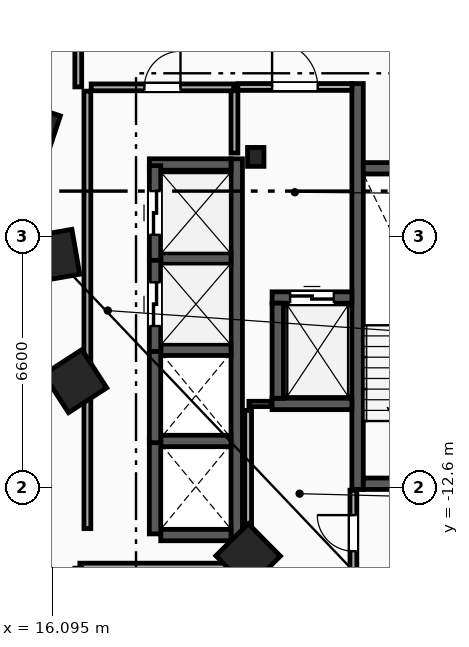
"""IFC4 building model, lengths in metres.
Left out: names, types, materials, properties, quantities, classifications, styles, units other than length and angle.
Written with IfcOpenShell. Run it as: python <this file> out.ifc"""

import sys

from ifc_helpers import new_model, si_unit, direction, frame, frame_2d, origin, origin_2d, place, context, subcontext, project, spatial, rectangle, i_section, extrude, element, fill, save


model = new_model("IFC4")
c1 = context("Model", 3, precision=1e-05, world=origin(), true_north=direction((0.0, 1.0)))
c2 = subcontext(c1, "Body", "Model", "MODEL_VIEW")
j1 = project(units=[si_unit("LENGTHUNIT", "METRE"), si_unit("PLANEANGLEUNIT", "RADIAN")], contexts=[c1])
p1 = place(None, origin())
s1 = spatial("IfcSite", under=j1, at=p1, CompositionType="ELEMENT")
p2 = place(p1, origin())
s2 = spatial("IfcBuilding", under=s1, at=p2, CompositionType="ELEMENT")
p3 = place(p2, frame((0.0, 0.0, 24.0)))
s3 = spatial("IfcBuildingStorey", under=s2, at=p3, CompositionType="ELEMENT", Elevation=24.0)
p4 = place(p3, frame((21.45, -3.9, 0.0), z_axis=(0.0, 0.0, 1.0), x_axis=(1.0, 0.0, 0.0)))
e1 = element("IfcColumn", 1, at=p4, inside=s3, PredefinedType="COLUMN", context=c2, shape_type="SweptSolid", body=[
    extrude(i_section(OverallWidth=0.432, OverallDepth=0.498, WebThickness=0.056, FlangeThickness=0.089, FilletRadius=0.018, at=origin_2d()), origin(), (0.0, 0.0, 1.0), 3.8),
])
for number, where, z_axis, x_axis in (
    (2, (15.55, -3.2, 0.0), (0.0, 0.0, 1.0), (-0.315, -0.949, 0.0)),
    (3, (16.125, -6.5, 0.0), (0.0, 0.0, 1.0), (0.172, -0.985, 0.0)),
    (4, (16.7, -9.8, 0.0), (0.0, 0.0, 1.0), (0.544, -0.839, 0.0)),
    (5, (21.25, -14.4, 0.0), (0.0, 0.0, 1.0), (0.703, -0.711, 0.0)),
):
    element("IfcColumn", number, at=place(p3, frame(where, z_axis=z_axis, x_axis=x_axis)), inside=s3, PredefinedType="COLUMN", context=c2, shape_type="SweptSolid", body=[
        extrude(rectangle(XDim=1.2, YDim=1.2, at=origin_2d()), origin(), (0.0, 0.0, 1.0), 3.8),
    ])
p5 = place(p3, frame((24.13, -12.65, 0.0), z_axis=(0.0, 0.0, 1.0), x_axis=(0.0, 1.0, 0.0)))
e6 = element("IfcWall", 6, at=p5, inside=s3, PredefinedType="SHEAR", context=c2, shape_type="SweptSolid", body=[
    extrude(rectangle(XDim=10.68, YDim=0.3, at=frame_2d((5.34, 0.0))), origin(), (0.0, 0.0, 1.0), 3.5),
])
p6 = place(p3, frame((24.28, -12.5, 0.0), z_axis=(0.0, 0.0, 1.0), x_axis=(1.0, 0.0, 0.0)))
e7 = element("IfcWall", 7, at=p6, inside=s3, PredefinedType="SHEAR", context=c2, shape_type="SweptSolid", body=[
    extrude(rectangle(XDim=3.16, YDim=0.3, at=frame_2d((1.58, 0.0))), origin(), (0.0, 0.0, 1.0), 3.5),
])
p7 = place(p6, frame((1.03, 0.0, 0.0)))
e8 = element("IfcOpeningElement", 8, at=p7, cuts=e7, PredefinedType="OPENING", context=c2, shape_type="SweptSolid", body=[
    extrude(rectangle(XDim=1.1, YDim=2.15, at=frame_2d((0.55, 1.075))), frame((0.0, 0.16, 0.0), z_axis=(0.0, -1.0, 0.0), x_axis=(1.0, 0.0, 0.0)), (0.0, 0.0, 1.0), 0.32),
])
p8 = place(p3, frame((24.28, -4.2, 0.0), z_axis=(0.0, 0.0, 1.0), x_axis=(1.0, 0.0, 0.0)))
e9 = element("IfcWall", 9, at=p8, inside=s3, PredefinedType="SHEAR", context=c2, shape_type="SweptSolid", body=[
    extrude(rectangle(XDim=3.16, YDim=0.3, at=frame_2d((1.58, 0.0))), origin(), (0.0, 0.0, 1.0), 3.5),
])
p9 = place(p3, frame((20.89, -3.8, 0.0), z_axis=(0.0, 0.0, 1.0), x_axis=(0.0, 1.0, 0.0)))
e10 = element("IfcWall", 10, at=p9, inside=s3, PredefinedType="PARTITIONING", context=c2, shape_type="SweptSolid", body=[
    extrude(rectangle(XDim=1.65, YDim=0.18, at=frame_2d((0.825, 0.0))), origin(), (0.0, 0.0, 1.0), 3.5),
])
p10 = place(p3, frame((20.98, -2.06, 0.0), z_axis=(0.0, 0.0, 1.0), x_axis=(1.0, 0.0, 0.0)))
e11 = element("IfcWall", 11, at=p10, inside=s3, PredefinedType="PARTITIONING", context=c2, shape_type="SweptSolid", body=[
    extrude(rectangle(XDim=3.0, YDim=0.18, at=frame_2d((1.5, 0.0))), origin(), (0.0, 0.0, 1.0), 3.5),
])
p11 = place(p10, frame((0.9, 0.0, 0.0)))
e12 = element("IfcOpeningElement", 12, at=p11, cuts=e11, PredefinedType="OPENING", context=c2, shape_type="SweptSolid", body=[
    extrude(rectangle(XDim=1.2, YDim=2.15, at=frame_2d((0.6, 1.075))), frame((0.0, 0.1, 0.0), z_axis=(0.0, -1.0, 0.0), x_axis=(1.0, 0.0, 0.0)), (0.0, 0.0, 1.0), 0.2),
])
p12 = place(p3, frame((21.88, -7.6, 0.0), z_axis=(0.0, 0.0, 1.0), x_axis=(1.0, 0.0, 0.0)))
e13 = element("IfcWall", 13, at=p12, inside=s3, PredefinedType="SHEAR", context=c2, shape_type="SweptSolid", body=[
    extrude(rectangle(XDim=2.1, YDim=0.3, at=frame_2d((1.05, 0.0))), origin(), (0.0, 0.0, 1.0), 3.5),
])
p13 = place(p12, frame((0.475, 0.0, 0.0)))
e14 = element("IfcOpeningElement", 14, at=p13, cuts=e13, PredefinedType="OPENING", context=c2, shape_type="SweptSolid", body=[
    extrude(rectangle(XDim=1.15, YDim=2.2, at=frame_2d((0.575, 1.1))), frame((0.0, 0.16, 0.0), z_axis=(0.0, -1.0, 0.0), x_axis=(1.0, 0.0, 0.0)), (0.0, 0.0, 1.0), 0.32),
])
p14 = place(p3, frame((21.88, -10.4, 0.0), z_axis=(0.0, 0.0, 1.0), x_axis=(1.0, 0.0, 0.0)))
e15 = element("IfcWall", 15, at=p14, inside=s3, PredefinedType="SHEAR", context=c2, shape_type="SweptSolid", body=[
    extrude(rectangle(XDim=2.1, YDim=0.3, at=frame_2d((1.05, 0.0))), origin(), (0.0, 0.0, 1.0), 3.5),
])
p15 = place(p3, frame((22.03, -10.25, 0.0), z_axis=(0.0, 0.0, 1.0), x_axis=(0.0, 1.0, 0.0)))
e16 = element("IfcWall", 16, at=p15, inside=s3, PredefinedType="SHEAR", context=c2, shape_type="SweptSolid", body=[
    extrude(rectangle(XDim=2.5, YDim=0.3, at=frame_2d((1.25, 0.0))), origin(), (0.0, 0.0, 1.0), 3.5),
])
p16 = place(p3, frame((20.95, -14.0, 0.0), z_axis=(0.0, 0.0, 1.0), x_axis=(0.0, 1.0, 0.0)))
e17 = element("IfcWall", 17, at=p16, inside=s3, PredefinedType="SHEAR", context=c2, shape_type="SweptSolid", body=[
    extrude(rectangle(XDim=10.05, YDim=0.3, at=frame_2d((5.025, 0.0))), origin(), (0.0, 0.0, 1.0), 3.5),
])
p17 = place(p3, frame((18.95, -13.85, 0.0), z_axis=(0.0, 0.0, 1.0), x_axis=(1.0, 0.0, 0.0)))
e18 = element("IfcWall", 18, at=p17, inside=s3, PredefinedType="SHEAR", context=c2, shape_type="SweptSolid", body=[
    extrude(rectangle(XDim=1.85, YDim=0.3, at=frame_2d((0.925, 0.0))), origin(), (0.0, 0.0, 1.0), 3.5),
])
p18 = place(p3, frame((18.65, -4.1, 0.0), z_axis=(0.0, 0.0, 1.0), x_axis=(1.0, 0.0, 0.0)))
e19 = element("IfcWall", 19, at=p18, inside=s3, PredefinedType="SHEAR", context=c2, shape_type="SweptSolid", body=[
    extrude(rectangle(XDim=2.15, YDim=0.3, at=frame_2d((1.075, 0.0))), origin(), (0.0, 0.0, 1.0), 3.5),
])
for number, where, z_axis, x_axis in (
    (20, (18.95, -11.375, 0.0), (0.0, 0.0, 1.0), (1.0, 0.0, 0.0)),
    (21, (18.95, -8.975, 0.0), (0.0, 0.0, 1.0), (1.0, 0.0, 0.0)),
    (22, (18.95, -6.575, 0.0), (0.0, 0.0, 1.0), (1.0, 0.0, 0.0)),
):
    element("IfcWall", number, at=place(p3, frame(where, z_axis=z_axis, x_axis=x_axis)), inside=s3, PredefinedType="SHEAR", context=c2, shape_type="SweptSolid", body=[
        extrude(rectangle(XDim=1.85, YDim=0.3, at=frame_2d((0.925, 0.0))), origin(), (0.0, 0.0, 1.0), 3.5),
    ])
for number, where, z_axis, x_axis in (
    (23, (18.8, -13.82, 0.0), (0.0, 0.0, 1.0), (0.0, 1.0, 0.0)),
    (24, (18.8, -11.42, 0.0), (0.0, 0.0, 1.0), (0.0, 1.0, 0.0)),
):
    element("IfcWall", number, at=place(p3, frame(where, z_axis=z_axis, x_axis=x_axis)), inside=s3, PredefinedType="SHEAR", context=c2, shape_type="SweptSolid", body=[
        extrude(rectangle(XDim=2.49, YDim=0.3, at=frame_2d((1.245, 0.0))), origin(), (0.0, 0.0, 1.0), 3.5),
    ])
p19 = place(p3, frame((18.8, -9.02, 0.0), z_axis=(0.0, 0.0, 1.0), x_axis=(0.0, 1.0, 0.0)))
e25 = element("IfcWall", 25, at=p19, inside=s3, PredefinedType="SHEAR", context=c2, shape_type="SweptSolid", body=[
    extrude(rectangle(XDim=2.49, YDim=0.3, at=frame_2d((1.245, 0.0))), origin(), (0.0, 0.0, 1.0), 3.5),
])
p20 = place(p19, frame((0.67, 0.0, 0.0)))
e26 = element("IfcOpeningElement", 26, at=p20, cuts=e25, PredefinedType="OPENING", context=c2, shape_type="SweptSolid", body=[
    extrude(rectangle(XDim=1.15, YDim=2.2, at=frame_2d((0.575, 1.1))), frame((0.0, 0.16, 0.0), z_axis=(0.0, -1.0, 0.0), x_axis=(1.0, 0.0, 0.0)), (0.0, 0.0, 1.0), 0.32),
])
p21 = place(p3, frame((18.8, -6.62, 0.0), z_axis=(0.0, 0.0, 1.0), x_axis=(0.0, 1.0, 0.0)))
e27 = element("IfcWall", 27, at=p21, inside=s3, PredefinedType="SHEAR", context=c2, shape_type="SweptSolid", body=[
    extrude(rectangle(XDim=2.49, YDim=0.3, at=frame_2d((1.245, 0.0))), origin(), (0.0, 0.0, 1.0), 3.5),
])
p22 = place(p21, frame((0.67, 0.0, 0.0)))
e28 = element("IfcOpeningElement", 28, at=p22, cuts=e27, PredefinedType="OPENING", context=c2, shape_type="SweptSolid", body=[
    extrude(rectangle(XDim=1.15, YDim=2.2, at=frame_2d((0.575, 1.1))), frame((0.0, 0.16, 0.0), z_axis=(0.0, -1.0, 0.0), x_axis=(1.0, 0.0, 0.0)), (0.0, 0.0, 1.0), 0.32),
])
p23 = place(p3, frame((17.02, -13.68, 0.0), z_axis=(0.0, 0.0, 1.0), x_axis=(0.0, 1.0, 0.0)))
e29 = element("IfcWall", 29, at=p23, inside=s3, PredefinedType="PARTITIONING", context=c2, shape_type="SweptSolid", body=[
    extrude(rectangle(XDim=11.51, YDim=0.18, at=frame_2d((5.755, 0.0))), origin(), (0.0, 0.0, 1.0), 3.5),
])
p24 = place(p3, frame((17.12, -2.07, 0.0), z_axis=(0.0, 0.0, 1.0), x_axis=(1.0, 0.0, 0.0)))
e30 = element("IfcWall", 30, at=p24, inside=s3, PredefinedType="PARTITIONING", context=c2, shape_type="SweptSolid", body=[
    extrude(rectangle(XDim=3.75, YDim=0.18, at=frame_2d((1.875, 0.0))), origin(), (0.0, 0.0, 1.0), 3.5),
])
p25 = place(p24, frame((1.4, 0.0, 0.0)))
e31 = element("IfcOpeningElement", 31, at=p25, cuts=e30, PredefinedType="OPENING", context=c2, shape_type="SweptSolid", body=[
    extrude(rectangle(XDim=0.95, YDim=2.1, at=frame_2d((0.475, 1.05))), frame((0.0, 0.1, 0.0), z_axis=(0.0, -1.0, 0.0), x_axis=(1.0, 0.0, 0.0)), (0.0, 0.0, 1.0), 0.2),
])
p26 = place(p3, frame((21.27, -10.4, 0.0), z_axis=(0.0, 0.0, 1.0), x_axis=(1.0, 0.0, 0.0)))
e32 = element("IfcWall", 32, at=p26, inside=s3, PredefinedType="PARTITIONING", context=c2, shape_type="SweptSolid", body=[
    extrude(rectangle(XDim=0.59, YDim=0.14, at=frame_2d((0.295, 0.0))), origin(), (0.0, 0.0, 1.0), 3.5),
])
p27 = place(p3, frame((21.25, -14.93, 0.0), z_axis=(0.0, 0.0, 1.0), x_axis=(0.0, 1.0, 0.0)))
e33 = element("IfcWall", 33, at=p27, inside=s3, PredefinedType="PARTITIONING", context=c2, shape_type="SweptSolid", body=[
    extrude(rectangle(XDim=4.36, YDim=0.18, at=frame_2d((2.18, 0.0))), origin(), (0.0, 0.0, 1.0), 3.5),
])
p28 = place(p3, frame((24.02, -14.93, 0.0), z_axis=(0.0, 0.0, 1.0), x_axis=(0.0, 1.0, 0.0)))
e34 = element("IfcWall", 34, at=p28, inside=s3, PredefinedType="PARTITIONING", context=c2, shape_type="SweptSolid", body=[
    extrude(rectangle(XDim=2.26, YDim=0.18, at=frame_2d((1.13, 0.0))), origin(), (0.0, 0.0, 1.0), 3.5),
])
p29 = place(p28, frame((0.655, 0.0, 0.0)))
e35 = element("IfcOpeningElement", 35, at=p29, cuts=e34, PredefinedType="OPENING", context=c2, shape_type="SweptSolid", body=[
    extrude(rectangle(XDim=0.95, YDim=2.1, at=frame_2d((0.475, 1.05))), frame((0.0, 0.1, 0.0), z_axis=(0.0, -1.0, 0.0), x_axis=(1.0, 0.0, 0.0)), (0.0, 0.0, 1.0), 0.2),
])
p30 = place(p3, frame((21.178, -14.68, 0.0), z_axis=(0.0, 0.0, 1.0), x_axis=(-1.0, 0.0, 0.0)))
e36 = element("IfcWall", 36, at=p30, inside=s3, PredefinedType="PARTITIONING", context=c2, shape_type="SweptSolid", body=[
    extrude(rectangle(XDim=4.357, YDim=0.18, at=frame_2d((2.178, 0.0))), origin(), (0.0, 0.0, 1.0), 3.5),
])
p31 = place(p3, frame((16.78, 0.329, 0.0), z_axis=(0.0, 0.0, 1.0), x_axis=(0.0, -1.0, 0.0)))
e37 = element("IfcWall", 37, at=p31, inside=s3, PredefinedType="PARTITIONING", context=c2, shape_type="SweptSolid", body=[
    extrude(rectangle(XDim=2.387, YDim=0.18, at=frame_2d((1.194, 0.0))), origin(), (0.0, 0.0, 1.0), 3.5),
])
p32 = place(p11, origin())
e38 = element("IfcDoor", 38, at=p32, inside=s3, OperationType="SINGLE_SWING_LEFT", PredefinedType="DOOR", context=c2, shape_type="SweptSolid", body=[
    extrude(rectangle(XDim=1.2, YDim=2.15, at=frame_2d((0.6, 1.075))), frame((0.0, 0.025, 0.0), z_axis=(0.0, -1.0, 0.0), x_axis=(1.0, 0.0, 0.0)), (0.0, 0.0, 1.0), 0.05),
])
fill(e12, e38)
p33 = place(p13, origin())
e39 = element("IfcDoor", 39, at=p33, inside=s3, OperationType="SLIDING_TO_LEFT", PredefinedType="TRAPDOOR", context=c2, shape_type="SweptSolid", body=[
    extrude(rectangle(XDim=1.15, YDim=2.2, at=frame_2d((0.575, 1.1))), frame((0.0, 0.025, 0.0), z_axis=(0.0, -1.0, 0.0), x_axis=(1.0, 0.0, 0.0)), (0.0, 0.0, 1.0), 0.05),
])
fill(e14, e39)
p34 = place(p20, origin())
e40 = element("IfcDoor", 40, at=p34, inside=s3, OperationType="SLIDING_TO_LEFT", PredefinedType="TRAPDOOR", context=c2, shape_type="SweptSolid", body=[
    extrude(rectangle(XDim=1.15, YDim=2.2, at=frame_2d((0.575, 1.1))), frame((0.0, 0.025, 0.0), z_axis=(0.0, -1.0, 0.0), x_axis=(1.0, 0.0, 0.0)), (0.0, 0.0, 1.0), 0.05),
])
fill(e26, e40)
p35 = place(p22, origin())
e41 = element("IfcDoor", 41, at=p35, inside=s3, OperationType="SLIDING_TO_LEFT", PredefinedType="TRAPDOOR", context=c2, shape_type="SweptSolid", body=[
    extrude(rectangle(XDim=1.15, YDim=2.2, at=frame_2d((0.575, 1.1))), frame((0.0, 0.025, 0.0), z_axis=(0.0, -1.0, 0.0), x_axis=(1.0, 0.0, 0.0)), (0.0, 0.0, 1.0), 0.05),
])
fill(e28, e41)
p36 = place(p25, origin())
e42 = element("IfcDoor", 42, at=p36, inside=s3, OperationType="SINGLE_SWING_RIGHT", PredefinedType="DOOR", context=c2, shape_type="SweptSolid", body=[
    extrude(rectangle(XDim=0.95, YDim=2.1, at=frame_2d((0.475, 1.05))), frame((0.0, 0.025, 0.0), z_axis=(0.0, -1.0, 0.0), x_axis=(1.0, 0.0, 0.0)), (0.0, 0.0, 1.0), 0.05),
])
fill(e31, e42)
p37 = place(p29, origin())
e43 = element("IfcDoor", 43, at=p37, inside=s3, OperationType="SINGLE_SWING_RIGHT", PredefinedType="DOOR", context=c2, shape_type="SweptSolid", body=[
    extrude(rectangle(XDim=0.95, YDim=2.1, at=frame_2d((0.475, 1.05))), frame((0.0, 0.025, 0.0), z_axis=(0.0, -1.0, 0.0), x_axis=(1.0, 0.0, 0.0)), (0.0, 0.0, 1.0), 0.05),
])
fill(e35, e43)
save(model, sys.argv[1])
